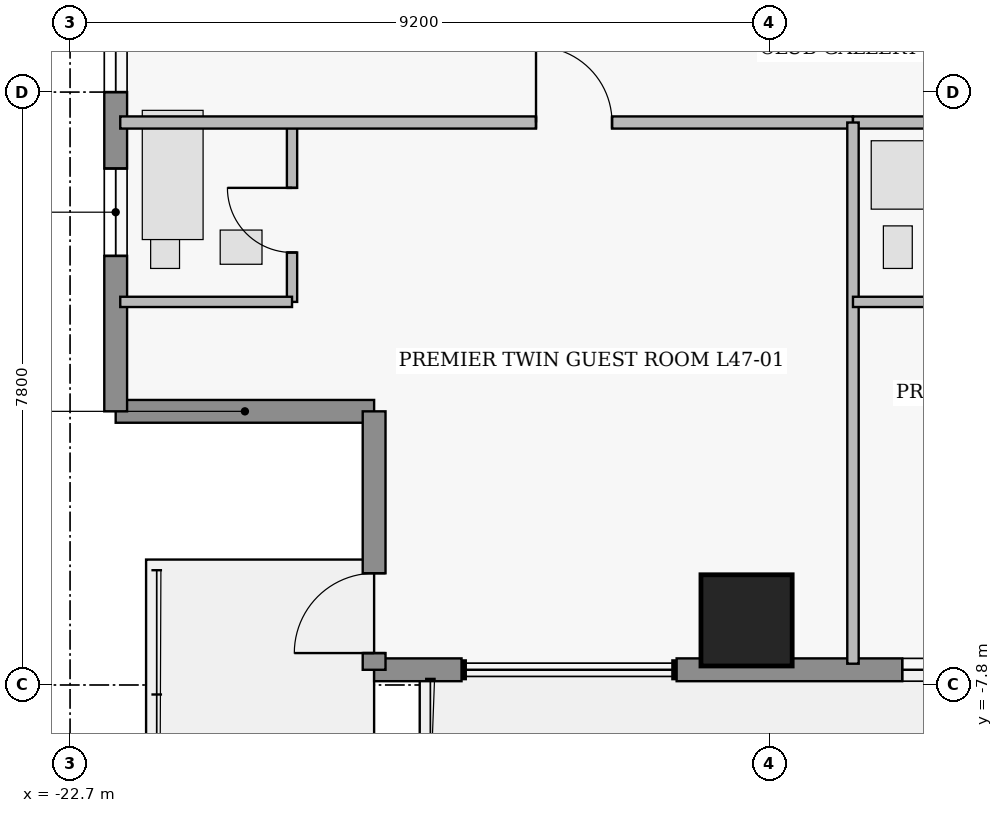
"""IFC4 building model, lengths in metres.
Left out: names, types, materials, properties, quantities, classifications, styles, units other than length and angle.
Written with IfcOpenShell. Run it as: python <this file> out.ifc"""

import sys

from ifc_helpers import new_model, si_unit, direction, frame, frame_2d, origin, origin_2d, place, context, subcontext, project, spatial, rectangle, extrude, element, fill, save


model = new_model("IFC4")
c1 = context("Model", 3, precision=1e-05, world=origin(), true_north=direction((0.0, 1.0)))
c2 = subcontext(c1, "Body", "Model", "MODEL_VIEW")
j1 = project(units=[si_unit("LENGTHUNIT", "METRE"), si_unit("PLANEANGLEUNIT", "RADIAN")], contexts=[c1])
p1 = place(None, origin())
s1 = spatial("IfcSite", under=j1, at=p1, CompositionType="ELEMENT")
p2 = place(p1, origin())
s2 = spatial("IfcBuilding", under=s1, at=p2, CompositionType="ELEMENT")
p3 = place(p2, frame((0.0, 0.0, 188.65)))
s3 = spatial("IfcBuildingStorey", under=s2, at=p3, CompositionType="ELEMENT", Elevation=188.65)
p4 = place(p3, frame((-13.8, -6.95, 0.0), z_axis=(0.0, 0.0, 1.0), x_axis=(1.0, 0.0, 0.0)))
e1 = element("IfcColumn", 1, at=p4, inside=s3, PredefinedType="COLUMN", context=c2, shape_type="SweptSolid", body=[
    extrude(rectangle(XDim=1.2, YDim=1.2, at=origin_2d()), origin(), (0.0, 0.0, 1.0), 3.75),
])
p5 = place(p3, frame((-18.7, -4.2, 0.0), z_axis=(0.0, 0.0, 1.0), x_axis=(-1.0, 0.0, 0.0)))
e2 = element("IfcWall", 2, at=p5, inside=s3, PredefinedType="STANDARD", context=c2, shape_type="SweptSolid", body=[
    extrude(rectangle(XDim=3.4, YDim=0.3, at=frame_2d((1.7, 0.0))), origin(), (0.0, 0.0, 1.0), 3.53),
])
p6 = place(p3, frame((-22.1, -4.2, 0.0), z_axis=(0.0, 0.0, 1.0), x_axis=(0.0, 1.0, 0.0)))
e3 = element("IfcWall", 3, at=p6, inside=s3, PredefinedType="STANDARD", context=c2, shape_type="SweptSolid", body=[
    extrude(rectangle(XDim=6.2, YDim=0.3, at=frame_2d((3.1, 0.0))), origin(), (0.0, 0.0, 1.0), 3.53),
])
p7 = place(p6, frame((2.045, 0.0, 0.95)))
e4 = element("IfcOpeningElement", 4, at=p7, cuts=e3, PredefinedType="OPENING", context=c2, shape_type="SweptSolid", body=[
    extrude(rectangle(XDim=1.15, YDim=1.55, at=frame_2d((0.575, 0.775))), frame((0.0, 0.16, 0.0), z_axis=(0.0, -1.0, 0.0), x_axis=(1.0, 0.0, 0.0)), (0.0, 0.0, 1.0), 0.32),
])
p8 = place(p6, frame((4.2, 0.0, 0.95)))
e5 = element("IfcOpeningElement", 5, at=p8, cuts=e3, PredefinedType="OPENING", context=c2, shape_type="SweptSolid", body=[
    extrude(rectangle(XDim=1.15, YDim=1.55, at=frame_2d((0.575, 0.775))), frame((0.0, 0.16, 0.0), z_axis=(0.0, -1.0, 0.0), x_axis=(1.0, 0.0, 0.0)), (0.0, 0.0, 1.0), 0.32),
])
p9 = place(p3, frame((-3.68, -7.6, 0.0), z_axis=(0.0, 0.0, 1.0), x_axis=(-1.0, 0.0, 0.0)))
e6 = element("IfcWall", 6, at=p9, inside=s3, PredefinedType="STANDARD", context=c2, shape_type="SweptSolid", body=[
    extrude(rectangle(XDim=11.04, YDim=0.3, at=frame_2d((5.52, 0.0))), origin(), (0.0, 0.0, 1.0), 3.53),
])
p10 = place(p9, frame((5.095, 0.0, 0.0)))
e7 = element("IfcOpeningElement", 7, at=p10, cuts=e6, PredefinedType="OPENING", context=c2, shape_type="SweptSolid", body=[
    extrude(rectangle(XDim=1.05, YDim=2.2, at=frame_2d((0.525, 1.1))), frame((0.0, 0.16, 0.0), z_axis=(0.0, -1.0, 0.0), x_axis=(1.0, 0.0, 0.0)), (0.0, 0.0, 1.0), 0.32),
])
p11 = place(p9, frame((3.167, 0.0, 0.95)))
e8 = element("IfcOpeningElement", 8, at=p11, cuts=e6, PredefinedType="OPENING", context=c2, shape_type="SweptSolid", body=[
    extrude(rectangle(XDim=1.15, YDim=1.55, at=frame_2d((0.575, 0.775))), frame((0.0, 0.16, 0.0), z_axis=(0.0, -1.0, 0.0), x_axis=(1.0, 0.0, 0.0)), (0.0, 0.0, 1.0), 0.32),
])
p12 = place(p9, frame((6.923, 0.0, 0.95)))
e9 = element("IfcOpeningElement", 9, at=p12, cuts=e6, PredefinedType="OPENING", context=c2, shape_type="SweptSolid", body=[
    extrude(rectangle(XDim=1.15, YDim=1.55, at=frame_2d((0.575, 0.775))), frame((0.0, 0.16, 0.0), z_axis=(0.0, -1.0, 0.0), x_axis=(1.0, 0.0, 0.0)), (0.0, 0.0, 1.0), 0.32),
])
p13 = place(p3, frame((-17.55, -7.6, 0.0), z_axis=(0.0, 0.0, 1.0), x_axis=(-1.0, 0.0, 0.0)))
e10 = element("IfcWall", 10, at=p13, inside=s3, PredefinedType="STANDARD", context=c2, shape_type="SweptSolid", body=[
    extrude(rectangle(XDim=1.15, YDim=0.3, at=frame_2d((0.575, 0.0))), origin(), (0.0, 0.0, 1.0), 3.53),
])
p14 = place(p3, frame((-18.7, -7.6, 0.0), z_axis=(0.0, 0.0, 1.0), x_axis=(0.0, 1.0, 0.0)))
e11 = element("IfcWall", 11, at=p14, inside=s3, PredefinedType="STANDARD", context=c2, shape_type="SweptSolid", body=[
    extrude(rectangle(XDim=3.4, YDim=0.3, at=frame_2d((1.7, 0.0))), origin(), (0.0, 0.0, 1.0), 3.53),
])
p15 = place(p14, frame((0.22, 0.0, 0.0)))
e12 = element("IfcOpeningElement", 12, at=p15, cuts=e11, PredefinedType="OPENING", context=c2, shape_type="SweptSolid", body=[
    extrude(rectangle(XDim=1.05, YDim=2.2, at=frame_2d((0.525, 1.1))), frame((0.0, 0.16, 0.0), z_axis=(0.0, -1.0, 0.0), x_axis=(1.0, 0.0, 0.0)), (0.0, 0.0, 1.0), 0.32),
])
p16 = place(p3, frame((-19.78, -2.76, 0.0), z_axis=(0.0, 0.0, 1.0), x_axis=(0.0, 1.0, 0.0)))
e13 = element("IfcWall", 13, at=p16, inside=s3, PredefinedType="PLUMBINGWALL", context=c2, shape_type="SweptSolid", body=[
    extrude(rectangle(XDim=2.36, YDim=0.135, at=frame_2d((1.18, 0.0))), origin(), (0.0, 0.0, 1.0), 3.53),
])
p17 = place(p16, frame((0.65, 0.0, 0.0)))
e14 = element("IfcOpeningElement", 14, at=p17, cuts=e13, PredefinedType="OPENING", context=c2, shape_type="SweptSolid", body=[
    extrude(rectangle(XDim=0.85, YDim=2.1, at=frame_2d((0.425, 1.05))), frame((0.0, 0.077, 0.0), z_axis=(0.0, -1.0, 0.0), x_axis=(1.0, 0.0, 0.0)), (0.0, 0.0, 1.0), 0.155),
])
p18 = place(p3, frame((-22.04, -0.4, 0.0), z_axis=(0.0, 0.0, 1.0), x_axis=(1.0, 0.0, 0.0)))
e15 = element("IfcWall", 15, at=p18, inside=s3, PredefinedType="PARTITIONING", context=c2, shape_type="SweptSolid", body=[
    extrude(rectangle(XDim=9.64, YDim=0.16, at=frame_2d((4.82, 0.0))), origin(), (0.0, 0.0, 1.0), 3.53),
])
p19 = place(p18, frame((5.47, 0.0, 0.0)))
e16 = element("IfcOpeningElement", 16, at=p19, cuts=e15, PredefinedType="OPENING", context=c2, shape_type="SweptSolid", body=[
    extrude(rectangle(XDim=1.0, YDim=2.15, at=frame_2d((0.5, 1.075))), frame((0.0, 0.09, 0.0), z_axis=(0.0, -1.0, 0.0), x_axis=(1.0, 0.0, 0.0)), (0.0, 0.0, 1.0), 0.18),
])
p20 = place(p3, frame((-12.4, -0.4, 0.0), z_axis=(0.0, 0.0, 1.0), x_axis=(1.0, 0.0, 0.0)))
e17 = element("IfcWall", 17, at=p20, inside=s3, PredefinedType="PARTITIONING", context=c2, shape_type="SweptSolid", body=[
    extrude(rectangle(XDim=6.2, YDim=0.16, at=frame_2d((3.1, 0.0))), origin(), (0.0, 0.0, 1.0), 3.53),
])
p21 = place(p20, frame((3.775, 0.0, 0.0)))
e18 = element("IfcOpeningElement", 18, at=p21, cuts=e17, PredefinedType="OPENING", context=c2, shape_type="SweptSolid", body=[
    extrude(rectangle(XDim=0.95, YDim=2.15, at=frame_2d((0.475, 1.075))), frame((0.0, 0.09, 0.0), z_axis=(0.0, -1.0, 0.0), x_axis=(1.0, 0.0, 0.0)), (0.0, 0.0, 1.0), 0.18),
])
p22 = place(p3, frame((-22.04, -2.76, 0.0), z_axis=(0.0, 0.0, 1.0), x_axis=(1.0, 0.0, 0.0)))
e19 = element("IfcWall", 19, at=p22, inside=s3, PredefinedType="PLUMBINGWALL", context=c2, shape_type="SweptSolid", body=[
    extrude(rectangle(XDim=2.26, YDim=0.135, at=frame_2d((1.13, 0.0))), origin(), (0.0, 0.0, 1.0), 3.53),
])
p23 = place(p3, frame((-12.4, -7.52, 0.0), z_axis=(0.0, 0.0, 1.0), x_axis=(0.0, 1.0, 0.0)))
e20 = element("IfcWall", 20, at=p23, inside=s3, PredefinedType="PARTITIONING", context=c2, shape_type="SweptSolid", body=[
    extrude(rectangle(XDim=7.12, YDim=0.15, at=frame_2d((3.56, 0.0))), origin(), (0.0, 0.0, 1.0), 3.53),
])
p24 = place(p3, frame((-12.4, -2.76, 0.0), z_axis=(0.0, 0.0, 1.0), x_axis=(1.0, 0.0, 0.0)))
e21 = element("IfcWall", 21, at=p24, inside=s3, PredefinedType="PLUMBINGWALL", context=c2, shape_type="SweptSolid", body=[
    extrude(rectangle(XDim=2.26, YDim=0.135, at=frame_2d((1.13, 0.0))), origin(), (0.0, 0.0, 1.0), 3.124),
])
p25 = place(p7, origin())
e22 = element("IfcWindow", 22, at=p25, inside=s3, PartitioningType="SINGLE_PANEL", PredefinedType="WINDOW", context=c2, shape_type="SweptSolid", body=[
    extrude(rectangle(XDim=1.15, YDim=1.55, at=frame_2d((0.575, 0.775))), frame((0.0, 0.03, 0.0), z_axis=(0.0, -1.0, 0.0), x_axis=(1.0, 0.0, 0.0)), (0.0, 0.0, 1.0), 0.06),
])
fill(e4, e22)
p26 = place(p8, origin())
e23 = element("IfcWindow", 23, at=p26, inside=s3, PartitioningType="SINGLE_PANEL", PredefinedType="WINDOW", context=c2, shape_type="SweptSolid", body=[
    extrude(rectangle(XDim=1.15, YDim=1.55, at=frame_2d((0.575, 0.775))), frame((0.0, 0.03, 0.0), z_axis=(0.0, -1.0, 0.0), x_axis=(1.0, 0.0, 0.0)), (0.0, 0.0, 1.0), 0.06),
])
fill(e5, e23)
p27 = place(p12, origin())
e24 = element("IfcWindow", 24, at=p27, inside=s3, PartitioningType="SINGLE_PANEL", PredefinedType="WINDOW", context=c2, shape_type="SweptSolid", body=[
    extrude(rectangle(XDim=1.15, YDim=1.55, at=frame_2d((0.575, 0.775))), frame((0.0, 0.03, 0.0), z_axis=(0.0, -1.0, 0.0), x_axis=(1.0, 0.0, 0.0)), (0.0, 0.0, 1.0), 0.06),
])
fill(e9, e24)
p28 = place(p15, origin())
e25 = element("IfcDoor", 25, at=p28, inside=s3, OperationType="SINGLE_SWING_LEFT", PredefinedType="DOOR", context=c2, shape_type="SweptSolid", body=[
    extrude(rectangle(XDim=1.05, YDim=2.2, at=frame_2d((0.525, 1.1))), frame((0.0, 0.025, 0.0), z_axis=(0.0, -1.0, 0.0), x_axis=(1.0, 0.0, 0.0)), (0.0, 0.0, 1.0), 0.05),
])
fill(e12, e25)
p29 = place(p17, origin())
e26 = element("IfcDoor", 26, at=p29, inside=s3, OperationType="SINGLE_SWING_RIGHT", PredefinedType="DOOR", context=c2, shape_type="SweptSolid", body=[
    extrude(rectangle(XDim=0.85, YDim=2.1, at=frame_2d((0.425, 1.05))), frame((0.0, 0.025, 0.0), z_axis=(0.0, -1.0, 0.0), x_axis=(1.0, 0.0, 0.0)), (0.0, 0.0, 1.0), 0.05),
])
fill(e14, e26)
p30 = place(p19, origin())
e27 = element("IfcDoor", 27, at=p30, inside=s3, OperationType="SINGLE_SWING_LEFT", PredefinedType="DOOR", context=c2, shape_type="SweptSolid", body=[
    extrude(rectangle(XDim=1.0, YDim=2.15, at=frame_2d((0.5, 1.075))), frame((0.0, 0.025, 0.0), z_axis=(0.0, -1.0, 0.0), x_axis=(1.0, 0.0, 0.0)), (0.0, 0.0, 1.0), 0.05),
])
fill(e16, e27)
save(model, sys.argv[1])
